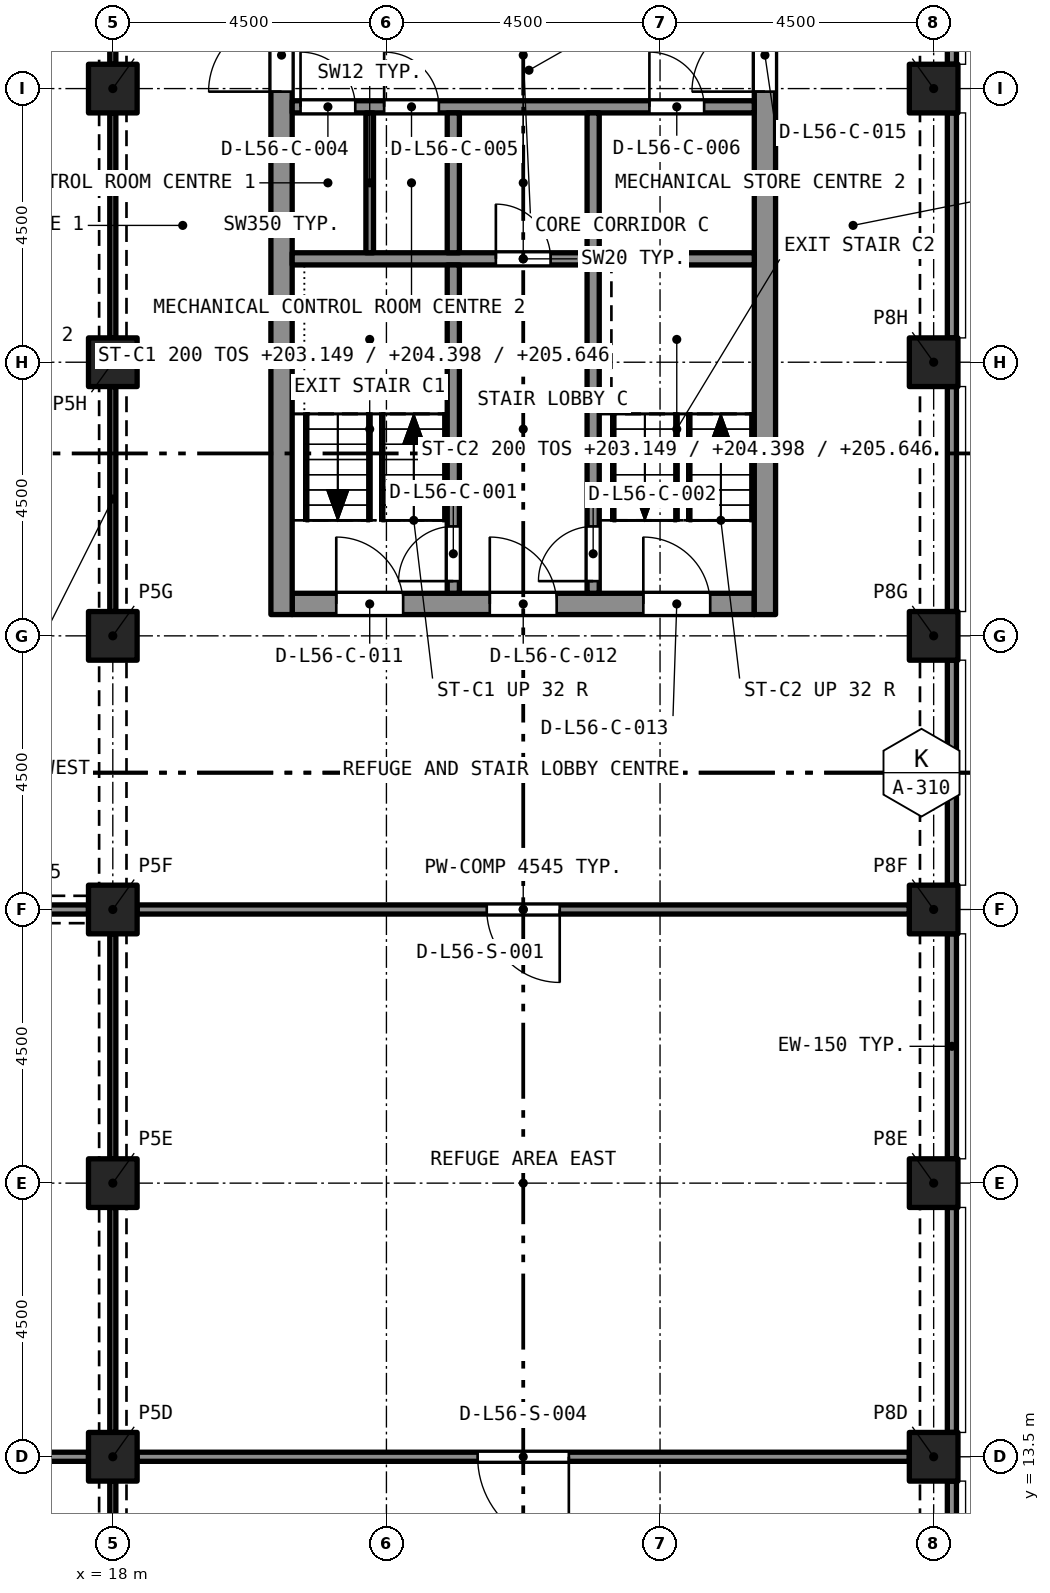
"""IFC4 building model, lengths in metres.
Left out: names, types, materials, properties, quantities, classifications, styles, units other than length and angle.
Written with IfcOpenShell. Run it as: python <this file> out.ifc"""

import sys

from ifc_helpers import new_model, si_unit, direction, frame, frame_2d, origin, origin_2d, place, context, subcontext, project, spatial, rectangle, extrude, element, fill, save


model = new_model("IFC4")
c1 = context("Model", 3, precision=1e-05, world=origin(), true_north=direction((0.0, 1.0)))
c2 = subcontext(c1, "Body", "Model", "MODEL_VIEW")
j1 = project(units=[si_unit("LENGTHUNIT", "METRE"), si_unit("PLANEANGLEUNIT", "RADIAN")], contexts=[c1])
p1 = place(None, origin())
s1 = spatial("IfcSite", under=j1, at=p1, CompositionType="ELEMENT")
p2 = place(p1, origin())
s2 = spatial("IfcBuilding", under=s1, at=p2, CompositionType="ELEMENT")
p3 = place(p2, frame((0.0, 0.0, 201.9)))
s3 = spatial("IfcBuildingStorey", under=s2, at=p3, CompositionType="ELEMENT", Elevation=201.9)
for number, where, z_axis, x_axis in (
    (1, (18.0, 13.5, 0.0), (0.0, 0.0, 1.0), (1.0, 0.0, 0.0)),
    (2, (31.5, 13.5, 0.0), (0.0, 0.0, 1.0), (1.0, 0.0, 0.0)),
    (3, (18.0, 18.0, 0.0), (0.0, 0.0, 1.0), (1.0, 0.0, 0.0)),
    (4, (31.5, 18.0, 0.0), (0.0, 0.0, 1.0), (1.0, 0.0, 0.0)),
    (5, (18.0, 22.5, 0.0), (0.0, 0.0, 1.0), (1.0, 0.0, 0.0)),
    (6, (31.5, 22.5, 0.0), (0.0, 0.0, 1.0), (1.0, 0.0, 0.0)),
    (7, (18.0, 27.0, 0.0), (0.0, 0.0, 1.0), (1.0, 0.0, 0.0)),
    (8, (31.5, 27.0, 0.0), (0.0, 0.0, 1.0), (1.0, 0.0, 0.0)),
    (9, (18.0, 31.5, 0.0), (0.0, 0.0, 1.0), (1.0, 0.0, 0.0)),
    (10, (31.5, 31.5, 0.0), (0.0, 0.0, 1.0), (1.0, 0.0, 0.0)),
    (11, (18.0, 36.0, 0.0), (0.0, 0.0, 1.0), (1.0, 0.0, 0.0)),
    (12, (31.5, 36.0, 0.0), (0.0, 0.0, 1.0), (1.0, 0.0, 0.0)),
):
    element("IfcColumn", number, at=place(p3, frame(where, z_axis=z_axis, x_axis=x_axis)), inside=s3, PredefinedType="COLUMN", context=c2, shape_type="SweptSolid", body=[
        extrude(rectangle(XDim=0.8, YDim=0.8, at=origin_2d()), origin(), (0.0, 0.0, 1.0), 4.995),
    ])
p4 = place(p3, frame((20.95, 27.525, 0.0), z_axis=(0.0, 0.0, 1.0), x_axis=(1.0, 0.0, 0.0)))
e13 = element("IfcWall", 13, at=p4, inside=s3, PredefinedType="SOLIDWALL", context=c2, shape_type="SweptSolid", body=[
    extrude(rectangle(XDim=7.6, YDim=0.35, at=frame_2d((3.8, 0.0))), origin(), (0.0, 0.0, 1.0), 4.995),
])
p5 = place(p4, frame((0.725, 0.0, 0.0)))
e14 = element("IfcOpeningElement", 14, at=p5, cuts=e13, PredefinedType="OPENING", context=c2, shape_type="SweptSolid", body=[
    extrude(rectangle(XDim=1.1, YDim=2.1, at=frame_2d((0.55, 1.05))), frame((0.0, 0.185, 0.0), z_axis=(0.0, -1.0, 0.0), x_axis=(1.0, 0.0, 0.0)), (0.0, 0.0, 1.0), 0.37),
])
p6 = place(p4, frame((3.25, 0.0, 0.0)))
e15 = element("IfcOpeningElement", 15, at=p6, cuts=e13, PredefinedType="OPENING", context=c2, shape_type="SweptSolid", body=[
    extrude(rectangle(XDim=1.1, YDim=2.1, at=frame_2d((0.55, 1.05))), frame((0.0, 0.185, 0.0), z_axis=(0.0, -1.0, 0.0), x_axis=(1.0, 0.0, 0.0)), (0.0, 0.0, 1.0), 0.37),
])
p7 = place(p4, frame((5.775, 0.0, 0.0)))
e16 = element("IfcOpeningElement", 16, at=p7, cuts=e13, PredefinedType="OPENING", context=c2, shape_type="SweptSolid", body=[
    extrude(rectangle(XDim=1.1, YDim=2.1, at=frame_2d((0.55, 1.05))), frame((0.0, 0.185, 0.0), z_axis=(0.0, -1.0, 0.0), x_axis=(1.0, 0.0, 0.0)), (0.0, 0.0, 1.0), 0.37),
])
p8 = place(p3, frame((20.775, 27.35, 0.0), z_axis=(0.0, 0.0, 1.0), x_axis=(0.0, 1.0, 0.0)))
e17 = element("IfcWall", 17, at=p8, inside=s3, PredefinedType="SOLIDWALL", context=c2, shape_type="SweptSolid", body=[
    extrude(rectangle(XDim=12.8, YDim=0.35, at=frame_2d((6.4, 0.0))), origin(), (0.0, 0.0, 1.0), 4.995),
])
p9 = place(p8, frame((8.6, 0.0, 0.0)))
e18 = element("IfcOpeningElement", 18, at=p9, cuts=e17, PredefinedType="OPENING", context=c2, shape_type="SweptSolid", body=[
    extrude(rectangle(XDim=1.2, YDim=2.1, at=frame_2d((0.6, 1.05))), frame((0.0, 0.185, 0.0), z_axis=(0.0, -1.0, 0.0), x_axis=(1.0, 0.0, 0.0)), (0.0, 0.0, 1.0), 0.37),
])
p10 = place(p3, frame((28.725, 27.35, 0.0), z_axis=(0.0, 0.0, 1.0), x_axis=(0.0, 1.0, 0.0)))
e19 = element("IfcWall", 19, at=p10, inside=s3, PredefinedType="SOLIDWALL", context=c2, shape_type="SweptSolid", body=[
    extrude(rectangle(XDim=12.8, YDim=0.35, at=frame_2d((6.4, 0.0))), origin(), (0.0, 0.0, 1.0), 4.995),
])
p11 = place(p10, frame((8.6, 0.0, 0.0)))
e20 = element("IfcOpeningElement", 20, at=p11, cuts=e19, PredefinedType="OPENING", context=c2, shape_type="SweptSolid", body=[
    extrude(rectangle(XDim=1.2, YDim=2.1, at=frame_2d((0.6, 1.05))), frame((0.0, 0.185, 0.0), z_axis=(0.0, -1.0, 0.0), x_axis=(1.0, 0.0, 0.0)), (0.0, 0.0, 1.0), 0.37),
])
for number, where, z_axis, x_axis in (
    (21, (31.8, 13.1, 0.0), (0.0, 0.0, 1.0), (0.0, -1.0, 0.0)),
    (22, (31.8, 17.6, 0.0), (0.0, 0.0, 1.0), (0.0, -1.0, 0.0)),
    (23, (31.8, 22.1, 0.0), (0.0, 0.0, 1.0), (0.0, -1.0, 0.0)),
    (24, (31.8, 26.6, 0.0), (0.0, 0.0, 1.0), (0.0, -1.0, 0.0)),
    (25, (31.8, 31.1, 0.0), (0.0, 0.0, 1.0), (0.0, -1.0, 0.0)),
    (26, (31.8, 35.6, 0.0), (0.0, 0.0, 1.0), (0.0, -1.0, 0.0)),
    (27, (31.8, 40.1, 0.0), (0.0, 0.0, 1.0), (0.0, -1.0, 0.0)),
):
    element("IfcWall", number, at=place(p3, frame(where, z_axis=z_axis, x_axis=x_axis)), inside=s3, PredefinedType="SOLIDWALL", context=c2, shape_type="SweptSolid", body=[
        extrude(rectangle(XDim=3.7, YDim=0.15, at=frame_2d((1.85, 0.0))), origin(), (0.0, 0.0, 1.0), 4.995),
    ])
p12 = place(p3, frame((20.95, 33.2, 0.0), z_axis=(0.0, 0.0, 1.0), x_axis=(1.0, 0.0, 0.0)))
e28 = element("IfcWall", 28, at=p12, inside=s3, PredefinedType="SOLIDWALL", context=c2, shape_type="SweptSolid", body=[
    extrude(rectangle(XDim=7.6, YDim=0.2, at=frame_2d((3.8, 0.0))), origin(), (0.0, 0.0, 1.0), 4.695),
])
p13 = place(p12, frame((3.35, 0.0, 0.0)))
e29 = element("IfcOpeningElement", 29, at=p13, cuts=e28, PredefinedType="OPENING", context=c2, shape_type="SweptSolid", body=[
    extrude(rectangle(XDim=0.9, YDim=2.1, at=frame_2d((0.45, 1.05))), frame((0.0, 0.11, 0.0), z_axis=(0.0, -1.0, 0.0), x_axis=(1.0, 0.0, 0.0)), (0.0, 0.0, 1.0), 0.22),
])
p14 = place(p3, frame((20.95, 35.7, 0.0), z_axis=(0.0, 0.0, 1.0), x_axis=(1.0, 0.0, 0.0)))
e30 = element("IfcWall", 30, at=p14, inside=s3, PredefinedType="SOLIDWALL", context=c2, shape_type="SweptSolid", body=[
    extrude(rectangle(XDim=7.6, YDim=0.2, at=frame_2d((3.8, 0.0))), origin(), (0.0, 0.0, 1.0), 4.695),
])
p15 = place(p14, frame((0.137, 0.0, 0.0)))
e31 = element("IfcOpeningElement", 31, at=p15, cuts=e30, PredefinedType="OPENING", context=c2, shape_type="SweptSolid", body=[
    extrude(rectangle(XDim=0.9, YDim=2.1, at=frame_2d((0.45, 1.05))), frame((0.0, 0.11, 0.0), z_axis=(0.0, -1.0, 0.0), x_axis=(1.0, 0.0, 0.0)), (0.0, 0.0, 1.0), 0.22),
])
p16 = place(p14, frame((1.512, 0.0, 0.0)))
e32 = element("IfcOpeningElement", 32, at=p16, cuts=e30, PredefinedType="OPENING", context=c2, shape_type="SweptSolid", body=[
    extrude(rectangle(XDim=0.9, YDim=2.1, at=frame_2d((0.45, 1.05))), frame((0.0, 0.11, 0.0), z_axis=(0.0, -1.0, 0.0), x_axis=(1.0, 0.0, 0.0)), (0.0, 0.0, 1.0), 0.22),
])
p17 = place(p14, frame((5.875, 0.0, 0.0)))
e33 = element("IfcOpeningElement", 33, at=p17, cuts=e30, PredefinedType="OPENING", context=c2, shape_type="SweptSolid", body=[
    extrude(rectangle(XDim=0.9, YDim=2.1, at=frame_2d((0.45, 1.05))), frame((0.0, 0.11, 0.0), z_axis=(0.0, -1.0, 0.0), x_axis=(1.0, 0.0, 0.0)), (0.0, 0.0, 1.0), 0.22),
])
p18 = place(p3, frame((23.6, 27.7, 0.0), z_axis=(0.0, 0.0, 1.0), x_axis=(0.0, 1.0, 0.0)))
e34 = element("IfcWall", 34, at=p18, inside=s3, PredefinedType="SOLIDWALL", context=c2, shape_type="SweptSolid", body=[
    extrude(rectangle(XDim=5.4, YDim=0.2, at=frame_2d((2.7, 0.0))), origin(), (0.0, 0.0, 1.0), 4.695),
])
p19 = place(p18, frame((0.2, 0.0, 0.0)))
e35 = element("IfcOpeningElement", 35, at=p19, cuts=e34, PredefinedType="OPENING", context=c2, shape_type="SweptSolid", body=[
    extrude(rectangle(XDim=0.9, YDim=2.1, at=frame_2d((0.45, 1.05))), frame((0.0, 0.11, 0.0), z_axis=(0.0, -1.0, 0.0), x_axis=(1.0, 0.0, 0.0)), (0.0, 0.0, 1.0), 0.22),
])
p20 = place(p3, frame((25.9, 27.7, 0.0), z_axis=(0.0, 0.0, 1.0), x_axis=(0.0, 1.0, 0.0)))
e36 = element("IfcWall", 36, at=p20, inside=s3, PredefinedType="SOLIDWALL", context=c2, shape_type="SweptSolid", body=[
    extrude(rectangle(XDim=5.4, YDim=0.2, at=frame_2d((2.7, 0.0))), origin(), (0.0, 0.0, 1.0), 4.695),
])
p21 = place(p20, frame((0.2, 0.0, 0.0)))
e37 = element("IfcOpeningElement", 37, at=p21, cuts=e36, PredefinedType="OPENING", context=c2, shape_type="SweptSolid", body=[
    extrude(rectangle(XDim=0.9, YDim=2.1, at=frame_2d((0.45, 1.05))), frame((0.0, 0.11, 0.0), z_axis=(0.0, -1.0, 0.0), x_axis=(1.0, 0.0, 0.0)), (0.0, 0.0, 1.0), 0.22),
])
for number, where, z_axis, x_axis in (
    (38, (23.6, 33.3, 0.0), (0.0, 0.0, 1.0), (0.0, 1.0, 0.0)),
    (39, (25.9, 33.3, 0.0), (0.0, 0.0, 1.0), (0.0, 1.0, 0.0)),
):
    element("IfcWall", number, at=place(p3, frame(where, z_axis=z_axis, x_axis=x_axis)), inside=s3, PredefinedType="SOLIDWALL", context=c2, shape_type="SweptSolid", body=[
        extrude(rectangle(XDim=2.3, YDim=0.2, at=frame_2d((1.15, 0.0))), origin(), (0.0, 0.0, 1.0), 4.695),
    ])
p22 = place(p3, frame((22.225, 33.3, 0.0), z_axis=(0.0, 0.0, 1.0), x_axis=(0.0, 1.0, 0.0)))
e40 = element("IfcWall", 40, at=p22, inside=s3, PredefinedType="PARTITIONING", context=c2, shape_type="SweptSolid", body=[
    extrude(rectangle(XDim=2.3, YDim=0.125, at=frame_2d((1.15, 0.0))), origin(), (0.0, 0.0, 1.0), 4.695),
])
for number, where, z_axis, x_axis in (
    (41, (18.0, 27.4, 0.0), (0.0, 0.0, 1.0), (0.0, 1.0, 0.0)),
    (42, (18.0, 31.9, 0.0), (0.0, 0.0, 1.0), (0.0, 1.0, 0.0)),
    (43, (18.0, 36.4, 0.0), (0.0, 0.0, 1.0), (0.0, 1.0, 0.0)),
):
    element("IfcWall", number, at=place(p3, frame(where, z_axis=z_axis, x_axis=x_axis)), inside=s3, PredefinedType="PARTITIONING", context=c2, shape_type="SweptSolid", body=[
        extrude(rectangle(XDim=3.7, YDim=0.1, at=frame_2d((1.85, 0.0))), origin(), (0.0, 0.0, 1.0), 4.175),
    ])
p23 = place(p3, frame((31.1, 22.5, 0.0), z_axis=(0.0, 0.0, 1.0), x_axis=(-1.0, 0.0, 0.0)))
e44 = element("IfcWall", 44, at=p23, inside=s3, PredefinedType="PARTITIONING", context=c2, shape_type="SweptSolid", body=[
    extrude(rectangle(XDim=12.7, YDim=0.15, at=frame_2d((6.35, 0.0))), origin(), (0.0, 0.0, 1.0), 4.545),
])
p24 = place(p23, frame((5.75, 0.0, 0.0)))
e45 = element("IfcOpeningElement", 45, at=p24, cuts=e44, PredefinedType="OPENING", context=c2, shape_type="SweptSolid", body=[
    extrude(rectangle(XDim=1.2, YDim=2.1, at=frame_2d((0.6, 1.05))), frame((0.0, 0.085, 0.0), z_axis=(0.0, -1.0, 0.0), x_axis=(1.0, 0.0, 0.0)), (0.0, 0.0, 1.0), 0.17),
])
p25 = place(p3, frame((31.1, 13.5, 0.0), z_axis=(0.0, 0.0, 1.0), x_axis=(-1.0, 0.0, 0.0)))
e46 = element("IfcWall", 46, at=p25, inside=s3, PredefinedType="PARTITIONING", context=c2, shape_type="SweptSolid", body=[
    extrude(rectangle(XDim=12.7, YDim=0.15, at=frame_2d((6.35, 0.0))), origin(), (0.0, 0.0, 1.0), 4.545),
])
p26 = place(p25, frame((5.6, 0.0, 0.0)))
e47 = element("IfcOpeningElement", 47, at=p26, cuts=e46, PredefinedType="OPENING", context=c2, shape_type="SweptSolid", body=[
    extrude(rectangle(XDim=1.5, YDim=2.4, at=frame_2d((0.75, 1.2))), frame((0.0, 0.085, 0.0), z_axis=(0.0, -1.0, 0.0), x_axis=(1.0, 0.0, 0.0)), (0.0, 0.0, 1.0), 0.17),
])
for number, where, z_axis, x_axis in (
    (48, (18.0, 9.4, 0.0), (0.0, 0.0, 1.0), (0.0, 1.0, 0.0)),
    (49, (18.0, 13.9, 0.0), (0.0, 0.0, 1.0), (0.0, 1.0, 0.0)),
    (50, (18.0, 18.4, 0.0), (0.0, 0.0, 1.0), (0.0, 1.0, 0.0)),
):
    element("IfcWall", number, at=place(p3, frame(where, z_axis=z_axis, x_axis=x_axis)), inside=s3, PredefinedType="PARTITIONING", context=c2, shape_type="SweptSolid", body=[
        extrude(rectangle(XDim=3.7, YDim=0.1, at=frame_2d((1.85, 0.0))), origin(), (0.0, 0.0, 1.0), 4.175),
    ])
p27 = place(p3, frame((17.6, 22.5, 0.0), z_axis=(0.0, 0.0, 1.0), x_axis=(-1.0, 0.0, 0.0)))
e51 = element("IfcWall", 51, at=p27, inside=s3, PredefinedType="PARTITIONING", context=c2, shape_type="SweptSolid", body=[
    extrude(rectangle(XDim=3.7, YDim=0.15, at=frame_2d((1.85, 0.0))), origin(), (0.0, 0.0, 1.0), 4.175),
])
p28 = place(p27, frame((1.25, 0.0, 0.0)))
e52 = element("IfcOpeningElement", 52, at=p28, cuts=e51, PredefinedType="OPENING", context=c2, shape_type="SweptSolid", body=[
    extrude(rectangle(XDim=1.2, YDim=2.1, at=frame_2d((0.6, 1.05))), frame((0.0, 0.085, 0.0), z_axis=(0.0, -1.0, 0.0), x_axis=(1.0, 0.0, 0.0)), (0.0, 0.0, 1.0), 0.17),
])
p29 = place(p3, frame((9.075, 13.5, 0.0), z_axis=(0.0, 0.0, 1.0), x_axis=(1.0, 0.0, 0.0)))
e53 = element("IfcWall", 53, at=p29, inside=s3, PredefinedType="PARTITIONING", context=c2, shape_type="SweptSolid", body=[
    extrude(rectangle(XDim=8.525, YDim=0.15, at=frame_2d((4.263, 0.0))), origin(), (0.0, 0.0, 1.0), 4.695),
])
p30 = place(p19, origin())
e54 = element("IfcDoor", 54, at=p30, inside=s3, OperationType="SINGLE_SWING_LEFT", PredefinedType="DOOR", context=c2, shape_type="SweptSolid", body=[
    extrude(rectangle(XDim=0.9, YDim=2.1, at=frame_2d((0.45, 1.05))), frame((0.0, 0.025, 0.0), z_axis=(0.0, -1.0, 0.0), x_axis=(1.0, 0.0, 0.0)), (0.0, 0.0, 1.0), 0.05),
])
fill(e35, e54)
p31 = place(p21, origin())
e55 = element("IfcDoor", 55, at=p31, inside=s3, OperationType="SINGLE_SWING_LEFT", PredefinedType="DOOR", context=c2, shape_type="SweptSolid", body=[
    extrude(rectangle(XDim=0.9, YDim=2.1, at=frame_2d((0.45, 1.05))), frame((0.0, 0.025, 0.0), z_axis=(0.0, -1.0, 0.0), x_axis=(1.0, 0.0, 0.0)), (0.0, 0.0, 1.0), 0.05),
])
fill(e37, e55)
p32 = place(p15, origin())
e56 = element("IfcDoor", 56, at=p32, inside=s3, OperationType="SINGLE_SWING_LEFT", PredefinedType="DOOR", context=c2, shape_type="SweptSolid", body=[
    extrude(rectangle(XDim=0.9, YDim=2.1, at=frame_2d((0.45, 1.05))), frame((0.0, 0.025, 0.0), z_axis=(0.0, -1.0, 0.0), x_axis=(1.0, 0.0, 0.0)), (0.0, 0.0, 1.0), 0.05),
])
fill(e31, e56)
p33 = place(p16, origin())
e57 = element("IfcDoor", 57, at=p33, inside=s3, OperationType="SINGLE_SWING_LEFT", PredefinedType="DOOR", context=c2, shape_type="SweptSolid", body=[
    extrude(rectangle(XDim=0.9, YDim=2.1, at=frame_2d((0.45, 1.05))), frame((0.0, 0.025, 0.0), z_axis=(0.0, -1.0, 0.0), x_axis=(1.0, 0.0, 0.0)), (0.0, 0.0, 1.0), 0.05),
])
fill(e32, e57)
p34 = place(p17, origin())
e58 = element("IfcDoor", 58, at=p34, inside=s3, OperationType="SINGLE_SWING_LEFT", PredefinedType="DOOR", context=c2, shape_type="SweptSolid", body=[
    extrude(rectangle(XDim=0.9, YDim=2.1, at=frame_2d((0.45, 1.05))), frame((0.0, 0.025, 0.0), z_axis=(0.0, -1.0, 0.0), x_axis=(1.0, 0.0, 0.0)), (0.0, 0.0, 1.0), 0.05),
])
fill(e33, e58)
p35 = place(p13, origin())
e59 = element("IfcDoor", 59, at=p35, inside=s3, OperationType="SINGLE_SWING_LEFT", PredefinedType="DOOR", context=c2, shape_type="SweptSolid", body=[
    extrude(rectangle(XDim=0.9, YDim=2.1, at=frame_2d((0.45, 1.05))), frame((0.0, 0.025, 0.0), z_axis=(0.0, -1.0, 0.0), x_axis=(1.0, 0.0, 0.0)), (0.0, 0.0, 1.0), 0.05),
])
fill(e29, e59)
p36 = place(p5, origin())
e60 = element("IfcDoor", 60, at=p36, inside=s3, OperationType="SINGLE_SWING_LEFT", PredefinedType="DOOR", context=c2, shape_type="SweptSolid", body=[
    extrude(rectangle(XDim=1.1, YDim=2.1, at=frame_2d((0.55, 1.05))), frame((0.0, 0.025, 0.0), z_axis=(0.0, -1.0, 0.0), x_axis=(1.0, 0.0, 0.0)), (0.0, 0.0, 1.0), 0.05),
])
fill(e14, e60)
p37 = place(p6, origin())
e61 = element("IfcDoor", 61, at=p37, inside=s3, OperationType="SINGLE_SWING_LEFT", PredefinedType="DOOR", context=c2, shape_type="SweptSolid", body=[
    extrude(rectangle(XDim=1.1, YDim=2.1, at=frame_2d((0.55, 1.05))), frame((0.0, 0.025, 0.0), z_axis=(0.0, -1.0, 0.0), x_axis=(1.0, 0.0, 0.0)), (0.0, 0.0, 1.0), 0.05),
])
fill(e15, e61)
p38 = place(p7, origin())
e62 = element("IfcDoor", 62, at=p38, inside=s3, OperationType="SINGLE_SWING_LEFT", PredefinedType="DOOR", context=c2, shape_type="SweptSolid", body=[
    extrude(rectangle(XDim=1.1, YDim=2.1, at=frame_2d((0.55, 1.05))), frame((0.0, 0.025, 0.0), z_axis=(0.0, -1.0, 0.0), x_axis=(1.0, 0.0, 0.0)), (0.0, 0.0, 1.0), 0.05),
])
fill(e16, e62)
p39 = place(p9, origin())
e63 = element("IfcDoor", 63, at=p39, inside=s3, OperationType="SINGLE_SWING_LEFT", PredefinedType="DOOR", context=c2, shape_type="SweptSolid", body=[
    extrude(rectangle(XDim=1.2, YDim=2.1, at=frame_2d((0.6, 1.05))), frame((0.0, 0.025, 0.0), z_axis=(0.0, -1.0, 0.0), x_axis=(1.0, 0.0, 0.0)), (0.0, 0.0, 1.0), 0.05),
])
fill(e18, e63)
p40 = place(p11, origin())
e64 = element("IfcDoor", 64, at=p40, inside=s3, OperationType="SINGLE_SWING_LEFT", PredefinedType="DOOR", context=c2, shape_type="SweptSolid", body=[
    extrude(rectangle(XDim=1.2, YDim=2.1, at=frame_2d((0.6, 1.05))), frame((0.0, 0.025, 0.0), z_axis=(0.0, -1.0, 0.0), x_axis=(1.0, 0.0, 0.0)), (0.0, 0.0, 1.0), 0.05),
])
fill(e20, e64)
p41 = place(p24, origin())
e65 = element("IfcDoor", 65, at=p41, inside=s3, OperationType="SINGLE_SWING_RIGHT", PredefinedType="DOOR", context=c2, shape_type="SweptSolid", body=[
    extrude(rectangle(XDim=1.2, YDim=2.1, at=frame_2d((0.6, 1.05))), frame((0.0, 0.025, 0.0), z_axis=(0.0, -1.0, 0.0), x_axis=(1.0, 0.0, 0.0)), (0.0, 0.0, 1.0), 0.05),
])
fill(e45, e65)
p42 = place(p26, origin())
e66 = element("IfcDoor", 66, at=p42, inside=s3, OperationType="DOUBLE_DOOR_SINGLE_SWING", PredefinedType="DOOR", context=c2, shape_type="SweptSolid", body=[
    extrude(rectangle(XDim=1.5, YDim=2.4, at=frame_2d((0.75, 1.2))), frame((0.0, 0.025, 0.0), z_axis=(0.0, -1.0, 0.0), x_axis=(1.0, 0.0, 0.0)), (0.0, 0.0, 1.0), 0.05),
])
fill(e47, e66)
save(model, sys.argv[1])
